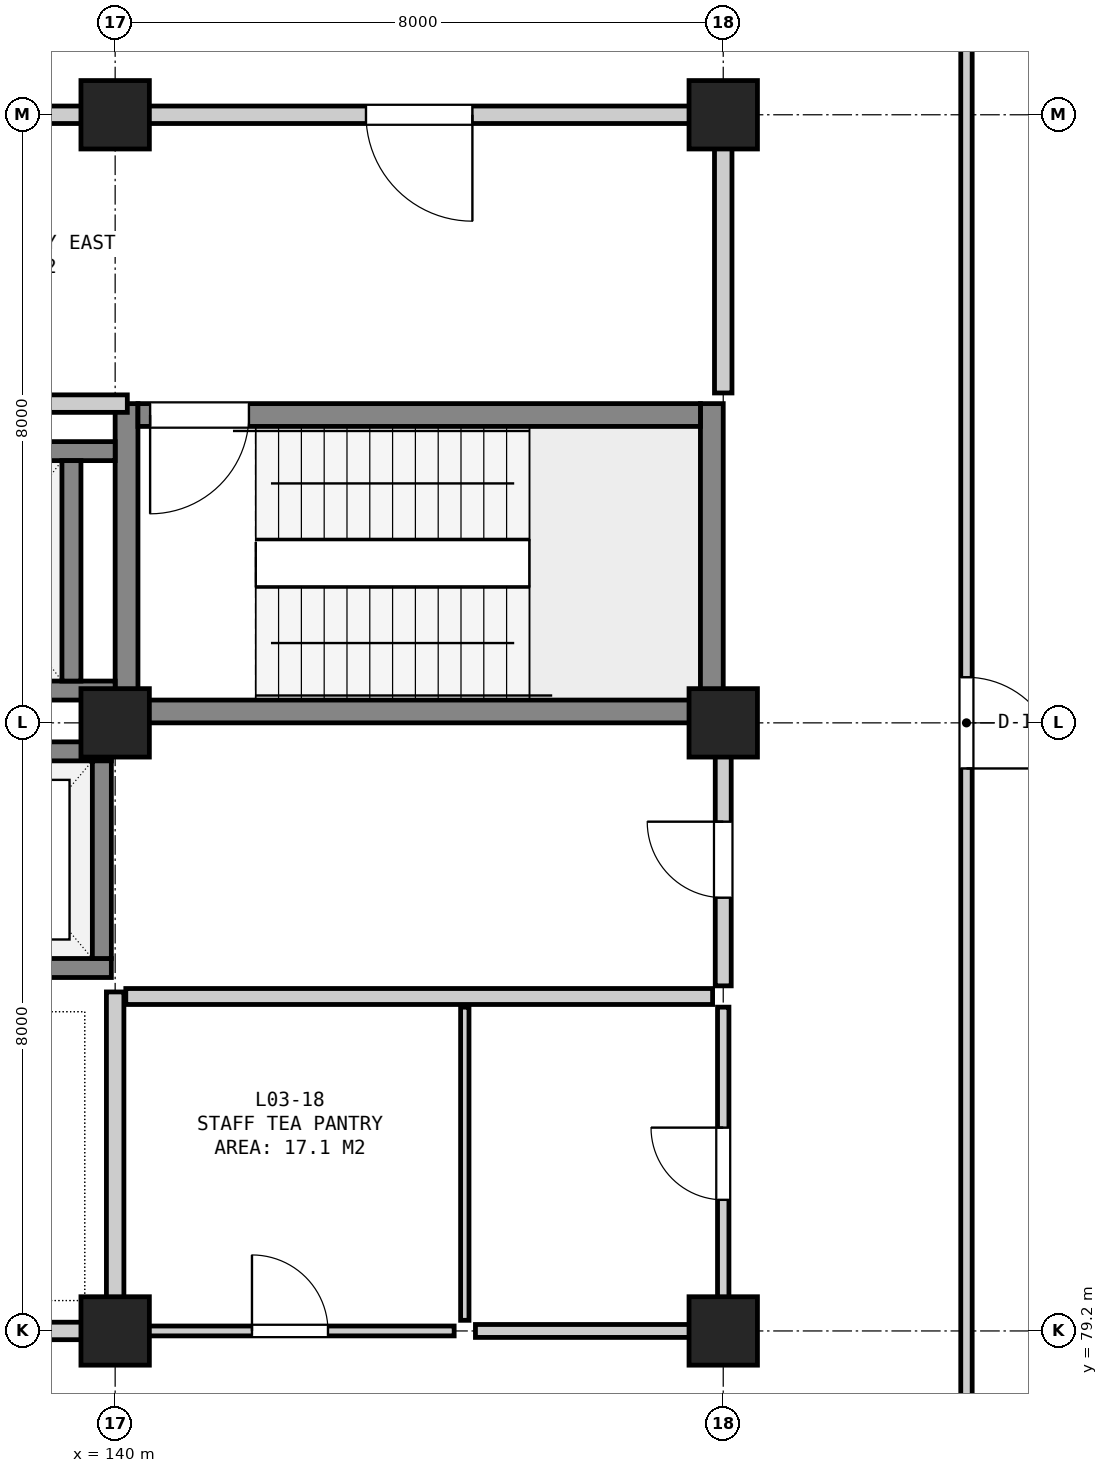
"""IFC4 building model, lengths in metres.
Left out: names, types, materials, properties, quantities, classifications, styles, units other than length and angle.
Written with IfcOpenShell. Run it as: python <this file> out.ifc"""

import sys

from ifc_helpers import new_model, si_unit, direction, frame, frame_2d, origin, origin_2d, place, context, subcontext, project, spatial, rectangle, extrude, element, fill, save


model = new_model("IFC4")
c1 = context("Model", 3, precision=1e-05, world=origin(), true_north=direction((0.0, 1.0)))
c2 = subcontext(c1, "Body", "Model", "MODEL_VIEW")
j1 = project(units=[si_unit("LENGTHUNIT", "METRE"), si_unit("PLANEANGLEUNIT", "RADIAN")], contexts=[c1])
p1 = place(None, origin())
s1 = spatial("IfcSite", under=j1, at=p1, CompositionType="ELEMENT")
p2 = place(p1, origin())
s2 = spatial("IfcBuilding", under=s1, at=p2, CompositionType="ELEMENT")
p3 = place(p2, frame((0.0, 0.0, 15.6)))
s3 = spatial("IfcBuildingStorey", under=s2, at=p3, CompositionType="ELEMENT", Elevation=15.6)
for number, where, z_axis, x_axis in (
    (1, (140.0, 79.2, 0.0), (0.0, 0.0, 1.0), (1.0, 0.0, 0.0)),
    (2, (140.0, 87.2, 0.0), (0.0, 0.0, 1.0), (1.0, 0.0, 0.0)),
    (3, (140.0, 95.2, 0.0), (0.0, 0.0, 1.0), (1.0, 0.0, 0.0)),
    (4, (148.0, 79.2, 0.0), (0.0, 0.0, 1.0), (1.0, 0.0, 0.0)),
    (5, (148.0, 87.2, 0.0), (0.0, 0.0, 1.0), (1.0, 0.0, 0.0)),
    (6, (148.0, 95.2, 0.0), (0.0, 0.0, 1.0), (1.0, 0.0, 0.0)),
):
    element("IfcColumn", number, at=place(p3, frame(where, z_axis=z_axis, x_axis=x_axis)), inside=s3, PredefinedType="COLUMN", context=c2, shape_type="SweptSolid", body=[
        extrude(rectangle(XDim=0.9, YDim=0.9, at=origin_2d()), origin(), (0.0, 0.0, 1.0), 4.2),
    ])
for number, where, z_axis, x_axis in (
    (7, (140.15, 87.2, 0.0), (0.0, 0.0, 1.0), (0.0, 1.0, 0.0)),
    (8, (147.85, 87.2, 0.0), (0.0, 0.0, 1.0), (0.0, 1.0, 0.0)),
):
    element("IfcWall", number, at=place(p3, frame(where, z_axis=z_axis, x_axis=x_axis)), inside=s3, PredefinedType="SHEAR", context=c2, shape_type="SweptSolid", body=[
        extrude(rectangle(XDim=4.2, YDim=0.3, at=frame_2d((2.1, 0.0))), origin(), (0.0, 0.0, 1.0), 3.9),
    ])
p4 = place(p3, frame((140.3, 87.35, 0.0), z_axis=(0.0, 0.0, 1.0), x_axis=(1.0, 0.0, 0.0)))
e9 = element("IfcWall", 9, at=p4, inside=s3, PredefinedType="SHEAR", context=c2, shape_type="SweptSolid", body=[
    extrude(rectangle(XDim=7.4, YDim=0.3, at=frame_2d((3.7, 0.0))), origin(), (0.0, 0.0, 1.0), 3.9),
])
p5 = place(p3, frame((140.3, 91.25, 0.0), z_axis=(0.0, 0.0, 1.0), x_axis=(1.0, 0.0, 0.0)))
e10 = element("IfcWall", 10, at=p5, inside=s3, PredefinedType="SHEAR", context=c2, shape_type="SweptSolid", body=[
    extrude(rectangle(XDim=7.4, YDim=0.3, at=frame_2d((3.7, 0.0))), origin(), (0.0, 0.0, 1.0), 3.9),
])
p6 = place(p5, frame((0.16, 0.0, 0.0)))
e11 = element("IfcOpeningElement", 11, at=p6, cuts=e10, PredefinedType="OPENING", context=c2, shape_type="SweptSolid", body=[
    extrude(rectangle(XDim=1.3, YDim=2.18, at=frame_2d((0.65, 1.09))), frame((0.0, 0.162, 0.0), z_axis=(0.0, -1.0, 0.0), x_axis=(1.0, 0.0, 0.0)), (0.0, 0.0, 1.0), 0.324),
])
p7 = place(p3, frame((136.85, 87.625, 0.0), z_axis=(0.0, 0.0, 1.0), x_axis=(1.0, 0.0, 0.0)))
e12 = element("IfcWall", 12, at=p7, inside=s3, PredefinedType="SHEAR", context=c2, shape_type="SweptSolid", body=[
    extrude(rectangle(XDim=3.15, YDim=0.25, at=frame_2d((1.575, 0.0))), origin(), (0.0, 0.0, 1.0), 3.9),
])
p8 = place(p3, frame((136.85, 90.775, 0.0), z_axis=(0.0, 0.0, 1.0), x_axis=(1.0, 0.0, 0.0)))
e13 = element("IfcWall", 13, at=p8, inside=s3, PredefinedType="SHEAR", context=c2, shape_type="SweptSolid", body=[
    extrude(rectangle(XDim=3.15, YDim=0.25, at=frame_2d((1.575, 0.0))), origin(), (0.0, 0.0, 1.0), 3.9),
])
p9 = place(p8, frame((0.8, 0.0, 0.0)))
e14 = element("IfcOpeningElement", 14, at=p9, cuts=e13, PredefinedType="OPENING", context=c2, shape_type="SweptSolid", body=[
    extrude(rectangle(XDim=1.1, YDim=2.15, at=frame_2d((0.55, 1.075))), frame((0.0, 0.137, 0.0), z_axis=(0.0, -1.0, 0.0), x_axis=(1.0, 0.0, 0.0)), (0.0, 0.0, 1.0), 0.274),
])
p10 = place(p3, frame((139.425, 87.75, 0.0), z_axis=(0.0, 0.0, 1.0), x_axis=(0.0, 1.0, 0.0)))
e15 = element("IfcWall", 15, at=p10, inside=s3, PredefinedType="SHEAR", context=c2, shape_type="SweptSolid", body=[
    extrude(rectangle(XDim=2.9, YDim=0.25, at=frame_2d((1.45, 0.0))), origin(), (0.0, 0.0, 1.0), 3.9),
])
p11 = place(p3, frame((137.25, 83.975, 0.0), z_axis=(0.0, 0.0, 1.0), x_axis=(1.0, 0.0, 0.0)))
e16 = element("IfcWall", 16, at=p11, inside=s3, PredefinedType="SHEAR", context=c2, shape_type="SweptSolid", body=[
    extrude(rectangle(XDim=2.7, YDim=0.25, at=frame_2d((1.35, 0.0))), origin(), (0.0, 0.0, 1.0), 3.9),
])
p12 = place(p11, frame((0.8, 0.0, 0.0)))
e17 = element("IfcOpeningElement", 17, at=p12, cuts=e16, PredefinedType="OPENING", context=c2, shape_type="SweptSolid", body=[
    extrude(rectangle(XDim=1.1, YDim=2.15, at=frame_2d((0.55, 1.075))), frame((0.0, 0.137, 0.0), z_axis=(0.0, -1.0, 0.0), x_axis=(1.0, 0.0, 0.0)), (0.0, 0.0, 1.0), 0.274),
])
p13 = place(p3, frame((137.25, 86.825, 0.0), z_axis=(0.0, 0.0, 1.0), x_axis=(1.0, 0.0, 0.0)))
e18 = element("IfcWall", 18, at=p13, inside=s3, PredefinedType="SHEAR", context=c2, shape_type="SweptSolid", body=[
    extrude(rectangle(XDim=2.7, YDim=0.25, at=frame_2d((1.35, 0.0))), origin(), (0.0, 0.0, 1.0), 3.9),
])
p14 = place(p3, frame((139.825, 84.1, 0.0), z_axis=(0.0, 0.0, 1.0), x_axis=(0.0, 1.0, 0.0)))
e19 = element("IfcWall", 19, at=p14, inside=s3, PredefinedType="SHEAR", context=c2, shape_type="SweptSolid", body=[
    extrude(rectangle(XDim=2.6, YDim=0.25, at=frame_2d((1.3, 0.0))), origin(), (0.0, 0.0, 1.0), 3.9),
])
p15 = place(p3, frame((136.14, 91.4, 0.0), z_axis=(0.0, 0.0, 1.0), x_axis=(1.0, 0.0, 0.0)))
e20 = element("IfcWall", 20, at=p15, inside=s3, PredefinedType="SOLIDWALL", context=c2, shape_type="SweptSolid", body=[
    extrude(rectangle(XDim=4.02, YDim=0.23, at=frame_2d((2.01, 0.0))), origin(), (0.0, 0.0, 1.0), 3.9),
])
p16 = place(p3, frame((136.14, 95.2, 0.0), z_axis=(0.0, 0.0, 1.0), x_axis=(1.0, 0.0, 0.0)))
e21 = element("IfcWall", 21, at=p16, inside=s3, PredefinedType="SOLIDWALL", context=c2, shape_type="SweptSolid", body=[
    extrude(rectangle(XDim=11.72, YDim=0.23, at=frame_2d((5.86, 0.0))), origin(), (0.0, 0.0, 1.0), 3.245),
])
p17 = place(p16, frame((7.16, 0.0, 0.0)))
e22 = element("IfcOpeningElement", 22, at=p17, cuts=e21, PredefinedType="OPENING", context=c2, shape_type="SweptSolid", body=[
    extrude(rectangle(XDim=1.4, YDim=2.2, at=frame_2d((0.7, 1.1))), frame((0.0, 0.127, 0.0), z_axis=(0.0, -1.0, 0.0), x_axis=(1.0, 0.0, 0.0)), (0.0, 0.0, 1.0), 0.254),
])
p18 = place(p3, frame((148.0, 91.54, 0.0), z_axis=(0.0, 0.0, 1.0), x_axis=(0.0, 1.0, 0.0)))
e23 = element("IfcWall", 23, at=p18, inside=s3, PredefinedType="SOLIDWALL", context=c2, shape_type="SweptSolid", body=[
    extrude(rectangle(XDim=3.52, YDim=0.23, at=frame_2d((1.76, 0.0))), origin(), (0.0, 0.0, 1.0), 3.095),
])
p19 = place(p3, frame((132.14, 79.2, 0.0), z_axis=(0.0, 0.0, 1.0), x_axis=(1.0, 0.0, 0.0)))
e24 = element("IfcWall", 24, at=p19, inside=s3, PredefinedType="SOLIDWALL", context=c2, shape_type="SweptSolid", body=[
    extrude(rectangle(XDim=7.72, YDim=0.23, at=frame_2d((3.86, 0.0))), origin(), (0.0, 0.0, 1.0), 3.295),
])
p20 = place(p19, frame((3.11, 0.0, 0.0)))
e25 = element("IfcOpeningElement", 25, at=p20, cuts=e24, PredefinedType="OPENING", context=c2, shape_type="SweptSolid", body=[
    extrude(rectangle(XDim=1.5, YDim=2.2, at=frame_2d((0.75, 1.1))), frame((0.0, 0.127, 0.0), z_axis=(0.0, -1.0, 0.0), x_axis=(1.0, 0.0, 0.0)), (0.0, 0.0, 1.0), 0.254),
])
p21 = place(p3, frame((140.0, 79.34, 0.0), z_axis=(0.0, 0.0, 1.0), x_axis=(0.0, 1.0, 0.0)))
e26 = element("IfcWall", 26, at=p21, inside=s3, PredefinedType="SOLIDWALL", context=c2, shape_type="SweptSolid", body=[
    extrude(rectangle(XDim=4.32, YDim=0.23, at=frame_2d((2.16, 0.0))), origin(), (0.0, 0.0, 1.0), 3.245),
])
p22 = place(p3, frame((140.14, 83.6, 0.0), z_axis=(0.0, 0.0, 1.0), x_axis=(1.0, 0.0, 0.0)))
e27 = element("IfcWall", 27, at=p22, inside=s3, PredefinedType="SOLIDWALL", context=c2, shape_type="SweptSolid", body=[
    extrude(rectangle(XDim=7.72, YDim=0.21, at=frame_2d((3.86, 0.0))), origin(), (0.0, 0.0, 1.0), 3.9),
])
p23 = place(p3, frame((148.0, 83.74, 0.0), z_axis=(0.0, 0.0, 1.0), x_axis=(0.0, 1.0, 0.0)))
e28 = element("IfcWall", 28, at=p23, inside=s3, PredefinedType="SOLIDWALL", context=c2, shape_type="SweptSolid", body=[
    extrude(rectangle(XDim=3.32, YDim=0.21, at=frame_2d((1.66, 0.0))), origin(), (0.0, 0.0, 1.0), 3.045),
])
p24 = place(p23, frame((1.16, 0.0, 0.0)))
e29 = element("IfcOpeningElement", 29, at=p24, cuts=e28, PredefinedType="OPENING", context=c2, shape_type="SweptSolid", body=[
    extrude(rectangle(XDim=1.0, YDim=2.15, at=frame_2d((0.5, 1.075))), frame((0.0, 0.117, 0.0), z_axis=(0.0, -1.0, 0.0), x_axis=(1.0, 0.0, 0.0)), (0.0, 0.0, 1.0), 0.234),
])
p25 = place(p3, frame((140.14, 79.2, 0.0), z_axis=(0.0, 0.0, 1.0), x_axis=(1.0, 0.0, 0.0)))
e30 = element("IfcWall", 30, at=p25, inside=s3, PredefinedType="PARTITIONING", context=c2, shape_type="SweptSolid", body=[
    extrude(rectangle(XDim=4.32, YDim=0.13, at=frame_2d((2.16, 0.0))), origin(), (0.0, 0.0, 1.0), 3.345),
])
p26 = place(p25, frame((1.66, 0.0, 0.0)))
e31 = element("IfcOpeningElement", 31, at=p26, cuts=e30, PredefinedType="OPENING", context=c2, shape_type="SweptSolid", body=[
    extrude(rectangle(XDim=1.0, YDim=2.15, at=frame_2d((0.5, 1.075))), frame((0.0, 0.077, 0.0), z_axis=(0.0, -1.0, 0.0), x_axis=(1.0, 0.0, 0.0)), (0.0, 0.0, 1.0), 0.154),
])
p27 = place(p3, frame((144.6, 79.34, 0.0), z_axis=(0.0, 0.0, 1.0), x_axis=(0.0, 1.0, 0.0)))
e32 = element("IfcWall", 32, at=p27, inside=s3, PredefinedType="PARTITIONING", context=c2, shape_type="SweptSolid", body=[
    extrude(rectangle(XDim=4.12, YDim=0.11, at=frame_2d((2.06, 0.0))), origin(), (0.0, 0.0, 1.0), 3.9),
])
p28 = place(p3, frame((144.74, 79.2, 0.0), z_axis=(0.0, 0.0, 1.0), x_axis=(1.0, 0.0, 0.0)))
e33 = element("IfcWall", 33, at=p28, inside=s3, PredefinedType="PARTITIONING", context=c2, shape_type="SweptSolid", body=[
    extrude(rectangle(XDim=3.12, YDim=0.17, at=frame_2d((1.56, 0.0))), origin(), (0.0, 0.0, 1.0), 3.345),
])
p29 = place(p3, frame((148.0, 79.34, 0.0), z_axis=(0.0, 0.0, 1.0), x_axis=(0.0, 1.0, 0.0)))
e34 = element("IfcWall", 34, at=p29, inside=s3, PredefinedType="PARTITIONING", context=c2, shape_type="SweptSolid", body=[
    extrude(rectangle(XDim=4.12, YDim=0.15, at=frame_2d((2.06, 0.0))), origin(), (0.0, 0.0, 1.0), 3.045),
])
p30 = place(p29, frame((1.585, 0.0, 0.0)))
e35 = element("IfcOpeningElement", 35, at=p30, cuts=e34, PredefinedType="OPENING", context=c2, shape_type="SweptSolid", body=[
    extrude(rectangle(XDim=0.95, YDim=2.15, at=frame_2d((0.475, 1.075))), frame((0.0, 0.087, 0.0), z_axis=(0.0, -1.0, 0.0), x_axis=(1.0, 0.0, 0.0)), (0.0, 0.0, 1.0), 0.174),
])
p31 = place(p3, frame((151.2, 76.14, 0.0), z_axis=(0.0, 0.0, 1.0), x_axis=(0.0, 1.0, 0.0)))
e36 = element("IfcWall", 36, at=p31, inside=s3, PredefinedType="PARTITIONING", context=c2, shape_type="SweptSolid", body=[
    extrude(rectangle(XDim=22.12, YDim=0.15, at=frame_2d((11.06, 0.0))), origin(), (0.0, 0.0, 1.0), 3.9),
])
p32 = place(p31, frame((10.46, 0.0, 0.0)))
e37 = element("IfcOpeningElement", 37, at=p32, cuts=e36, PredefinedType="OPENING", context=c2, shape_type="SweptSolid", body=[
    extrude(rectangle(XDim=1.2, YDim=2.15, at=frame_2d((0.6, 1.075))), frame((0.0, 0.087, 0.0), z_axis=(0.0, -1.0, 0.0), x_axis=(1.0, 0.0, 0.0)), (0.0, 0.0, 1.0), 0.174),
])
p33 = place(p6, frame((1.3, 0.0, 0.0), z_axis=(0.0, 0.0, 1.0), x_axis=(-1.0, 0.0, 0.0)))
e38 = element("IfcDoor", 38, at=p33, inside=s3, OperationType="SINGLE_SWING_RIGHT", PredefinedType="DOOR", context=c2, shape_type="SweptSolid", body=[
    extrude(rectangle(XDim=1.3, YDim=2.18, at=frame_2d((0.65, 1.09))), frame((0.0, 0.025, 0.0), z_axis=(0.0, -1.0, 0.0), x_axis=(1.0, 0.0, 0.0)), (0.0, 0.0, 1.0), 0.05),
])
fill(e11, e38)
p34 = place(p17, frame((1.4, 0.0, 0.0), z_axis=(0.0, 0.0, 1.0), x_axis=(-1.0, 0.0, 0.0)))
e39 = element("IfcDoor", 39, at=p34, inside=s3, OperationType="SINGLE_SWING_LEFT", PredefinedType="DOOR", context=c2, shape_type="SweptSolid", body=[
    extrude(rectangle(XDim=1.4, YDim=2.2, at=frame_2d((0.7, 1.1))), frame((0.0, 0.025, 0.0), z_axis=(0.0, -1.0, 0.0), x_axis=(1.0, 0.0, 0.0)), (0.0, 0.0, 1.0), 0.05),
])
fill(e22, e39)
p35 = place(p24, origin())
e40 = element("IfcDoor", 40, at=p35, inside=s3, OperationType="SINGLE_SWING_RIGHT", PredefinedType="DOOR", context=c2, shape_type="SweptSolid", body=[
    extrude(rectangle(XDim=1.0, YDim=2.15, at=frame_2d((0.5, 1.075))), frame((0.0, 0.025, 0.0), z_axis=(0.0, -1.0, 0.0), x_axis=(1.0, 0.0, 0.0)), (0.0, 0.0, 1.0), 0.05),
])
fill(e29, e40)
p36 = place(p26, origin())
e41 = element("IfcDoor", 41, at=p36, inside=s3, OperationType="SINGLE_SWING_LEFT", PredefinedType="DOOR", context=c2, shape_type="SweptSolid", body=[
    extrude(rectangle(XDim=1.0, YDim=2.15, at=frame_2d((0.5, 1.075))), frame((0.0, 0.025, 0.0), z_axis=(0.0, -1.0, 0.0), x_axis=(1.0, 0.0, 0.0)), (0.0, 0.0, 1.0), 0.05),
])
fill(e31, e41)
p37 = place(p30, origin())
e42 = element("IfcDoor", 42, at=p37, inside=s3, OperationType="SINGLE_SWING_RIGHT", PredefinedType="DOOR", context=c2, shape_type="SweptSolid", body=[
    extrude(rectangle(XDim=0.95, YDim=2.15, at=frame_2d((0.475, 1.075))), frame((0.0, 0.025, 0.0), z_axis=(0.0, -1.0, 0.0), x_axis=(1.0, 0.0, 0.0)), (0.0, 0.0, 1.0), 0.05),
])
fill(e35, e42)
p38 = place(p32, frame((1.2, 0.0, 0.0), z_axis=(0.0, 0.0, 1.0), x_axis=(-1.0, 0.0, 0.0)))
e43 = element("IfcDoor", 43, at=p38, inside=s3, OperationType="SINGLE_SWING_RIGHT", PredefinedType="DOOR", context=c2, shape_type="SweptSolid", body=[
    extrude(rectangle(XDim=1.2, YDim=2.15, at=frame_2d((0.6, 1.075))), frame((0.0, 0.025, 0.0), z_axis=(0.0, -1.0, 0.0), x_axis=(1.0, 0.0, 0.0)), (0.0, 0.0, 1.0), 0.05),
])
fill(e37, e43)
save(model, sys.argv[1])
